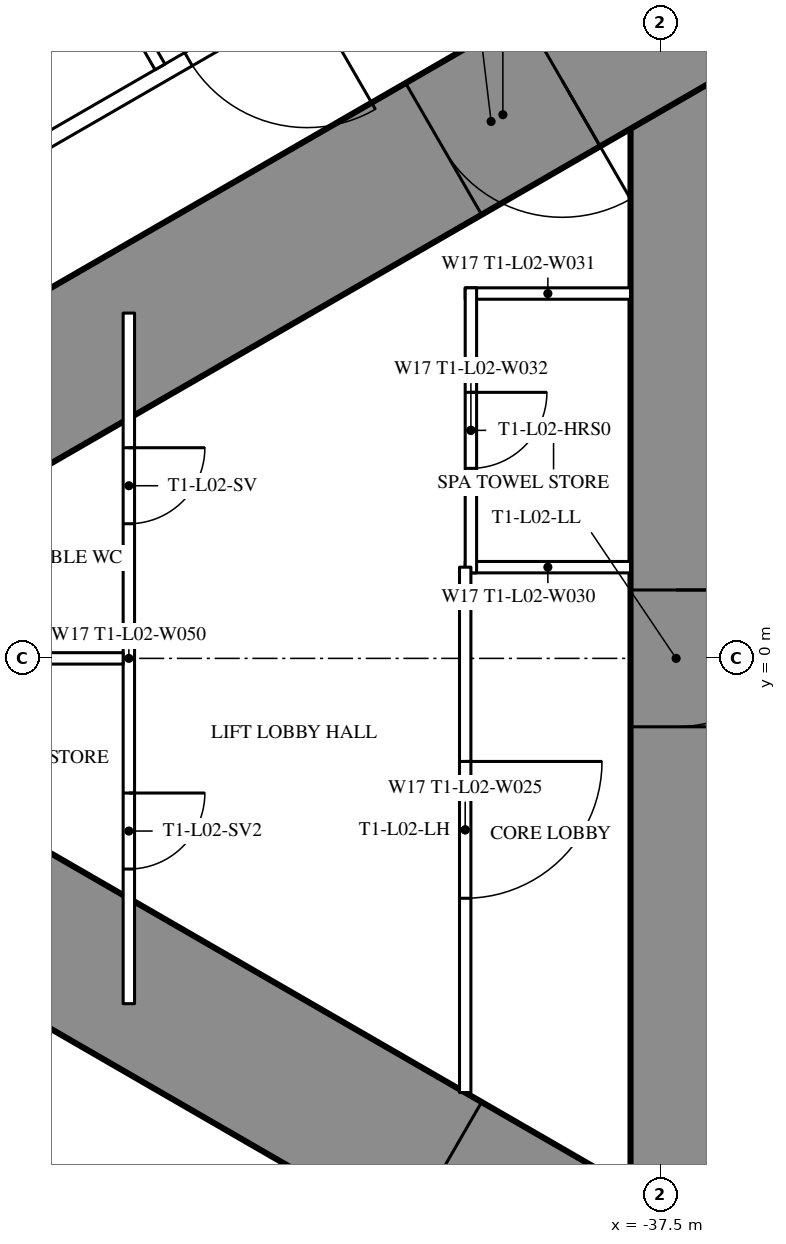
"""IFC4 building model, lengths in metres.
Left out: names, types, materials, properties, quantities, classifications, styles, units other than length and angle.
Written with IfcOpenShell. Run it as: python <this file> out.ifc"""

import sys

from ifc_helpers import new_model, si_unit, direction, frame, frame_2d, origin, place, context, subcontext, project, spatial, rectangle, extrude, element, fill, save


model = new_model("IFC4")
c1 = context("Model", 3, precision=1e-05, world=origin(), true_north=direction((0.0, 1.0)))
c2 = subcontext(c1, "Body", "Model", "MODEL_VIEW")
j1 = project(units=[si_unit("LENGTHUNIT", "METRE"), si_unit("PLANEANGLEUNIT", "RADIAN")], contexts=[c1])
p1 = place(None, origin())
s1 = spatial("IfcSite", under=j1, at=p1, CompositionType="ELEMENT")
p2 = place(p1, origin())
s2 = spatial("IfcBuilding", under=s1, at=p2, CompositionType="ELEMENT")
p3 = place(p2, frame((0.0, 0.0, 12.6)))
s3 = spatial("IfcBuildingStorey", under=s2, at=p3, CompositionType="ELEMENT", Elevation=12.6)
p4 = place(p3, frame((-37.3, 8.6, 0.0), z_axis=(0.0, 0.0, 1.0), x_axis=(0.0, -1.0, 0.0)))
e1 = element("IfcWall", 1, at=p4, inside=s3, PredefinedType="SHEAR", context=c2, shape_type="SweptSolid", body=[
    extrude(rectangle(XDim=17.2, YDim=1.2, at=frame_2d((8.6, 0.0))), origin(), (0.0, 0.0, 1.0), 5.4),
])
p5 = place(p4, frame((7.7, 0.0, 0.0)))
e2 = element("IfcOpeningElement", 2, at=p5, cuts=e1, PredefinedType="OPENING", context=c2, shape_type="SweptSolid", body=[
    extrude(rectangle(XDim=1.8, YDim=2.2, at=frame_2d((0.9, 1.1))), frame((0.0, 0.61, 0.0), z_axis=(0.0, -1.0, 0.0), x_axis=(1.0, 0.0, 0.0)), (0.0, 0.0, 1.0), 1.22),
])
p6 = place(p3, frame((-27.2, 14.3, 0.0), z_axis=(0.0, 0.0, 1.0), x_axis=(-0.866026593062, -0.499997940104, 0.0)))
e3 = element("IfcWall", 3, at=p6, inside=s3, PredefinedType="SHEAR", context=c2, shape_type="SweptSolid", body=[
    extrude(rectangle(XDim=28.946, YDim=2.0, at=frame_2d((14.473, 0.0))), origin(), (0.0, 0.0, 1.0), 5.4),
])
p7 = place(p6, frame((4.6, 0.0, 0.0)))
e4 = element("IfcOpeningElement", 4, at=p7, cuts=e3, PredefinedType="OPENING", context=c2, shape_type="SweptSolid", body=[
    extrude(rectangle(XDim=1.0, YDim=2.2, at=frame_2d((0.5, 1.1))), frame((0.0, 1.01, 0.0), z_axis=(0.0, -1.0, 0.0), x_axis=(1.0, 0.0, 0.0)), (0.0, 0.0, 1.0), 2.02),
])
p8 = place(p6, frame((13.395, 0.0, 0.0)))
e5 = element("IfcOpeningElement", 5, at=p8, cuts=e3, PredefinedType="OPENING", context=c2, shape_type="SweptSolid", body=[
    extrude(rectangle(XDim=1.8, YDim=2.2, at=frame_2d((0.9, 1.1))), frame((0.0, 1.01, 0.0), z_axis=(0.0, -1.0, 0.0), x_axis=(1.0, 0.0, 0.0)), (0.0, 0.0, 1.0), 2.02),
])
p9 = place(p3, frame((-27.2, -14.3, 0.0), z_axis=(0.0, 0.0, 1.0), x_axis=(-0.866024044937, 0.500002353585, 0.0)))
e6 = element("IfcWall", 6, at=p9, inside=s3, PredefinedType="SHEAR", context=c2, shape_type="SweptSolid", body=[
    extrude(rectangle(XDim=27.533, YDim=2.0, at=frame_2d((13.767, 0.0))), origin(), (0.0, 0.0, 1.0), 5.4),
])
p10 = place(p9, frame((4.6, 0.0, 0.0)))
e7 = element("IfcOpeningElement", 7, at=p10, cuts=e6, PredefinedType="OPENING", context=c2, shape_type="SweptSolid", body=[
    extrude(rectangle(XDim=1.0, YDim=2.2, at=frame_2d((0.5, 1.1))), frame((0.0, 1.01, 0.0), z_axis=(0.0, -1.0, 0.0), x_axis=(1.0, 0.0, 0.0)), (0.0, 0.0, 1.0), 2.02),
])
p11 = place(p9, frame((13.395, 0.0, 0.0)))
e8 = element("IfcOpeningElement", 8, at=p11, cuts=e6, PredefinedType="OPENING", context=c2, shape_type="SweptSolid", body=[
    extrude(rectangle(XDim=1.8, YDim=2.2, at=frame_2d((0.9, 1.1))), frame((0.0, 1.01, 0.0), z_axis=(0.0, -1.0, 0.0), x_axis=(1.0, 0.0, 0.0)), (0.0, 0.0, 1.0), 2.02),
])
p12 = place(p3, frame((-37.9, 11.24, 0.0), z_axis=(0.0, 0.0, 1.0), x_axis=(-0.866022995118, -0.50000417191, 0.0)))
e9 = element("IfcWall", 9, at=p12, inside=s3, PredefinedType="PARTITIONING", context=c2, shape_type="SweptSolid", body=[
    extrude(rectangle(XDim=22.48, YDim=0.2, at=frame_2d((11.24, 0.0))), origin(), (0.0, 0.0, 1.0), 4.25),
])
p13 = place(p12, frame((14.644, 0.0, 0.0)))
e10 = element("IfcOpeningElement", 10, at=p13, cuts=e9, PredefinedType="OPENING", context=c2, shape_type="SweptSolid", body=[
    extrude(rectangle(XDim=1.8, YDim=2.2, at=frame_2d((0.9, 1.1))), frame((0.0, 0.11, 0.0), z_axis=(0.0, -1.0, 0.0), x_axis=(1.0, 0.0, 0.0)), (0.0, 0.0, 1.0), 0.22),
])
p14 = place(p12, frame((20.069, 0.0, 0.0)))
e11 = element("IfcOpeningElement", 11, at=p14, cuts=e9, PredefinedType="OPENING", context=c2, shape_type="SweptSolid", body=[
    extrude(rectangle(XDim=1.8, YDim=2.2, at=frame_2d((0.9, 1.1))), frame((0.0, 0.11, 0.0), z_axis=(0.0, -1.0, 0.0), x_axis=(1.0, 0.0, 0.0)), (0.0, 0.0, 1.0), 0.22),
])
p15 = place(p12, frame((4.915, 0.0, 0.0)))
e12 = element("IfcOpeningElement", 12, at=p15, cuts=e9, PredefinedType="OPENING", context=c2, shape_type="SweptSolid", body=[
    extrude(rectangle(XDim=1.8, YDim=2.2, at=frame_2d((0.9, 1.1))), frame((0.0, 0.11, 0.0), z_axis=(0.0, -1.0, 0.0), x_axis=(1.0, 0.0, 0.0)), (0.0, 0.0, 1.0), 0.22),
])
p16 = place(p3, frame((-37.12, -11.69, 0.0), z_axis=(0.0, 0.0, 1.0), x_axis=(-0.866028803602, 0.499994111297, 0.0)))
e13 = element("IfcWall", 13, at=p16, inside=s3, PredefinedType="PARTITIONING", context=c2, shape_type="SweptSolid", body=[
    extrude(rectangle(XDim=23.26, YDim=0.2, at=frame_2d((11.63, 0.0))), origin(), (0.0, 0.0, 1.0), 4.25),
])
p17 = place(p16, frame((20.909, 0.0, 0.0)))
e14 = element("IfcOpeningElement", 14, at=p17, cuts=e13, PredefinedType="OPENING", context=c2, shape_type="SweptSolid", body=[
    extrude(rectangle(XDim=1.8, YDim=2.2, at=frame_2d((0.9, 1.1))), frame((0.0, 0.11, 0.0), z_axis=(0.0, -1.0, 0.0), x_axis=(1.0, 0.0, 0.0)), (0.0, 0.0, 1.0), 0.22),
])
p18 = place(p16, frame((15.544, 0.0, 0.0)))
e15 = element("IfcOpeningElement", 15, at=p18, cuts=e13, PredefinedType="OPENING", context=c2, shape_type="SweptSolid", body=[
    extrude(rectangle(XDim=1.8, YDim=2.2, at=frame_2d((0.9, 1.1))), frame((0.0, 0.11, 0.0), z_axis=(0.0, -1.0, 0.0), x_axis=(1.0, 0.0, 0.0)), (0.0, 0.0, 1.0), 0.22),
])
p19 = place(p16, frame((5.365, 0.0, 0.0)))
e16 = element("IfcOpeningElement", 16, at=p19, cuts=e13, PredefinedType="OPENING", context=c2, shape_type="SweptSolid", body=[
    extrude(rectangle(XDim=1.8, YDim=2.2, at=frame_2d((0.9, 1.1))), frame((0.0, 0.11, 0.0), z_axis=(0.0, -1.0, 0.0), x_axis=(1.0, 0.0, 0.0)), (0.0, 0.0, 1.0), 0.22),
])
for number, where, z_axis, x_axis in (
    (17, (-37.9, 1.2, 0.0), (0.0, 0.0, 1.0), (-1.0, 0.0, 0.0)),
    (18, (-37.9, 4.8, 0.0), (0.0, 0.0, 1.0), (-1.0, 0.0, 0.0)),
):
    element("IfcWall", number, at=place(p3, frame(where, z_axis=z_axis, x_axis=x_axis)), inside=s3, PredefinedType="PARTITIONING", context=c2, shape_type="SweptSolid", body=[
        extrude(rectangle(XDim=2.175, YDim=0.15, at=frame_2d((1.087, 0.0))), origin(), (0.0, 0.0, 1.0), 5.15),
    ])
p20 = place(p3, frame((-40.0, 4.875, 0.0), z_axis=(0.0, 0.0, 1.0), x_axis=(0.0, -1.0, 0.0)))
e19 = element("IfcWall", 19, at=p20, inside=s3, PredefinedType="PARTITIONING", context=c2, shape_type="SweptSolid", body=[
    extrude(rectangle(XDim=3.75, YDim=0.15, at=frame_2d((1.875, 0.0))), origin(), (0.0, 0.0, 1.0), 5.15),
])
p21 = place(p20, frame((1.375, 0.0, 0.0)))
e20 = element("IfcOpeningElement", 20, at=p21, cuts=e19, PredefinedType="OPENING", context=c2, shape_type="SweptSolid", body=[
    extrude(rectangle(XDim=1.0, YDim=2.2, at=frame_2d((0.5, 1.1))), frame((0.0, 0.085, 0.0), z_axis=(0.0, -1.0, 0.0), x_axis=(1.0, 0.0, 0.0)), (0.0, 0.0, 1.0), 0.17),
])
p22 = place(p3, frame((-40.075, 1.2, 0.0), z_axis=(0.0, 0.0, 1.0), x_axis=(0.0, -1.0, 0.0)))
e21 = element("IfcWall", 21, at=p22, inside=s3, PredefinedType="PARTITIONING", context=c2, shape_type="SweptSolid", body=[
    extrude(rectangle(XDim=6.912, YDim=0.15, at=frame_2d((3.456, 0.0))), origin(), (0.0, 0.0, 1.0), 5.15),
])
p23 = place(p22, frame((2.556, 0.0, 0.0)))
e22 = element("IfcOpeningElement", 22, at=p23, cuts=e21, PredefinedType="OPENING", context=c2, shape_type="SweptSolid", body=[
    extrude(rectangle(XDim=1.8, YDim=2.2, at=frame_2d((0.9, 1.1))), frame((0.0, 0.085, 0.0), z_axis=(0.0, -1.0, 0.0), x_axis=(1.0, 0.0, 0.0)), (0.0, 0.0, 1.0), 0.17),
])
p24 = place(p3, frame((-44.5, 4.543, 0.0), z_axis=(0.0, 0.0, 1.0), x_axis=(0.0, -1.0, 0.0)))
e23 = element("IfcWall", 23, at=p24, inside=s3, PredefinedType="PARTITIONING", context=c2, shape_type="SweptSolid", body=[
    extrude(rectangle(XDim=9.085, YDim=0.15, at=frame_2d((4.543, 0.0))), origin(), (0.0, 0.0, 1.0), 5.15),
])
p25 = place(p24, frame((1.771, 0.0, 0.0)))
e24 = element("IfcOpeningElement", 24, at=p25, cuts=e23, PredefinedType="OPENING", context=c2, shape_type="SweptSolid", body=[
    extrude(rectangle(XDim=1.0, YDim=2.2, at=frame_2d((0.5, 1.1))), frame((0.0, 0.085, 0.0), z_axis=(0.0, -1.0, 0.0), x_axis=(1.0, 0.0, 0.0)), (0.0, 0.0, 1.0), 0.17),
])
p26 = place(p24, frame((6.314, 0.0, 0.0)))
e25 = element("IfcOpeningElement", 25, at=p26, cuts=e23, PredefinedType="OPENING", context=c2, shape_type="SweptSolid", body=[
    extrude(rectangle(XDim=1.0, YDim=2.2, at=frame_2d((0.5, 1.1))), frame((0.0, 0.085, 0.0), z_axis=(0.0, -1.0, 0.0), x_axis=(1.0, 0.0, 0.0)), (0.0, 0.0, 1.0), 0.17),
])
p27 = place(p3, frame((-44.575, 0.0, 0.0), z_axis=(0.0, 0.0, 1.0), x_axis=(-1.0, 0.0, 0.0)))
e26 = element("IfcWall", 26, at=p27, inside=s3, PredefinedType="PARTITIONING", context=c2, shape_type="SweptSolid", body=[
    extrude(rectangle(XDim=8.593, YDim=0.15, at=frame_2d((4.297, 0.0))), origin(), (0.0, 0.0, 1.0), 4.15),
])
p28 = place(p3, frame((-44.09, 7.782, 0.0), z_axis=(0.0, 0.0, 1.0), x_axis=(-0.499982560684, 0.866035472144, 0.0)))
e27 = element("IfcWall", 27, at=p28, inside=s3, PredefinedType="PARTITIONING", context=c2, shape_type="SweptSolid", body=[
    extrude(rectangle(XDim=2.275, YDim=0.15, at=frame_2d((1.137, 0.0))), origin(), (0.0, 0.0, 1.0), 5.15),
])
p29 = place(p15, origin())
e28 = element("IfcDoor", 28, at=p29, inside=s3, OperationType="DOUBLE_DOOR_SINGLE_SWING", PredefinedType="DOOR", context=c2, shape_type="SweptSolid", body=[
    extrude(rectangle(XDim=1.8, YDim=2.2, at=frame_2d((0.9, 1.1))), frame((0.0, 0.025, 0.0), z_axis=(0.0, -1.0, 0.0), x_axis=(1.0, 0.0, 0.0)), (0.0, 0.0, 1.0), 0.05),
])
fill(e12, e28)
p30 = place(p21, origin())
e29 = element("IfcDoor", 29, at=p30, inside=s3, OperationType="SINGLE_SWING_LEFT", PredefinedType="DOOR", context=c2, shape_type="SweptSolid", body=[
    extrude(rectangle(XDim=1.0, YDim=2.2, at=frame_2d((0.5, 1.1))), frame((0.0, 0.025, 0.0), z_axis=(0.0, -1.0, 0.0), x_axis=(1.0, 0.0, 0.0)), (0.0, 0.0, 1.0), 0.05),
])
fill(e20, e29)
p31 = place(p23, origin())
e30 = element("IfcDoor", 30, at=p31, inside=s3, OperationType="DOUBLE_DOOR_SINGLE_SWING", PredefinedType="DOOR", context=c2, shape_type="SweptSolid", body=[
    extrude(rectangle(XDim=1.8, YDim=2.2, at=frame_2d((0.9, 1.1))), frame((0.0, 0.025, 0.0), z_axis=(0.0, -1.0, 0.0), x_axis=(1.0, 0.0, 0.0)), (0.0, 0.0, 1.0), 0.05),
])
fill(e22, e30)
p32 = place(p25, origin())
e31 = element("IfcDoor", 31, at=p32, inside=s3, OperationType="SINGLE_SWING_LEFT", PredefinedType="DOOR", context=c2, shape_type="SweptSolid", body=[
    extrude(rectangle(XDim=1.0, YDim=2.2, at=frame_2d((0.5, 1.1))), frame((0.0, 0.025, 0.0), z_axis=(0.0, -1.0, 0.0), x_axis=(1.0, 0.0, 0.0)), (0.0, 0.0, 1.0), 0.05),
])
fill(e24, e31)
p33 = place(p26, origin())
e32 = element("IfcDoor", 32, at=p33, inside=s3, OperationType="SINGLE_SWING_LEFT", PredefinedType="DOOR", context=c2, shape_type="SweptSolid", body=[
    extrude(rectangle(XDim=1.0, YDim=2.2, at=frame_2d((0.5, 1.1))), frame((0.0, 0.025, 0.0), z_axis=(0.0, -1.0, 0.0), x_axis=(1.0, 0.0, 0.0)), (0.0, 0.0, 1.0), 0.05),
])
fill(e25, e32)
p34 = place(p8, origin())
e33 = element("IfcDoor", 33, at=p34, inside=s3, OperationType="DOUBLE_DOOR_SINGLE_SWING", PredefinedType="DOOR", context=c2, shape_type="SweptSolid", body=[
    extrude(rectangle(XDim=1.8, YDim=2.2, at=frame_2d((0.9, 1.1))), frame((0.0, 0.025, 0.0), z_axis=(0.0, -1.0, 0.0), x_axis=(1.0, 0.0, 0.0)), (0.0, 0.0, 1.0), 0.05),
])
fill(e5, e33)
p35 = place(p5, origin())
e34 = element("IfcDoor", 34, at=p35, inside=s3, OperationType="DOUBLE_DOOR_SINGLE_SWING", PredefinedType="DOOR", context=c2, shape_type="SweptSolid", body=[
    extrude(rectangle(XDim=1.8, YDim=2.2, at=frame_2d((0.9, 1.1))), frame((0.0, 0.025, 0.0), z_axis=(0.0, -1.0, 0.0), x_axis=(1.0, 0.0, 0.0)), (0.0, 0.0, 1.0), 0.05),
])
fill(e2, e34)
save(model, sys.argv[1])
